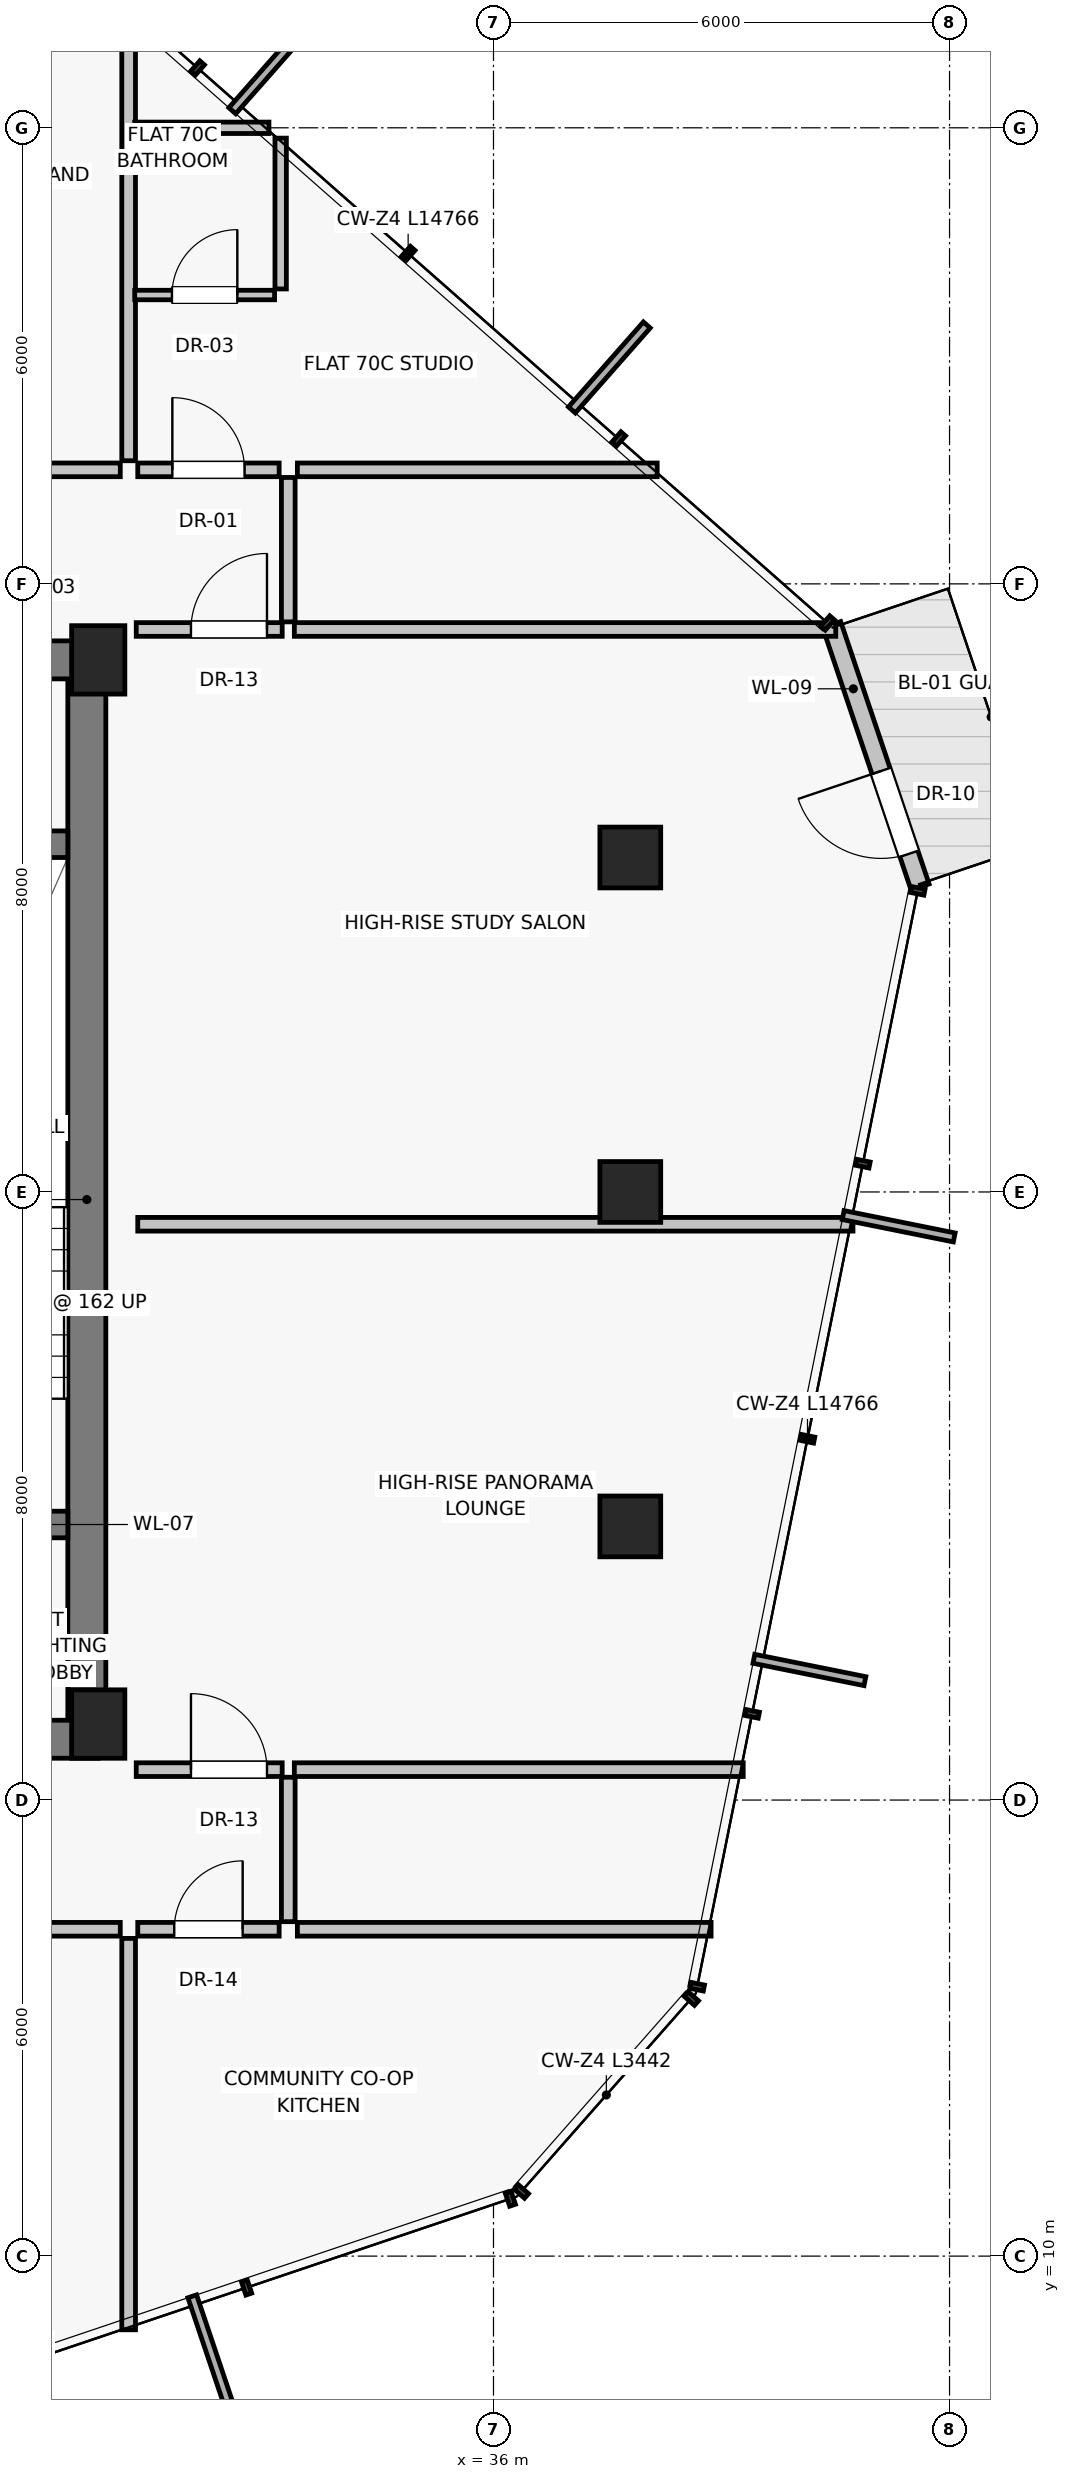
"""IFC4 building model, lengths in metres.
Left out: names, types, materials, properties, quantities, classifications, styles, units other than length and angle.
Written with IfcOpenShell. Run it as: python <this file> out.ifc"""

import sys

from ifc_helpers import new_model, si_unit, direction, frame, frame_2d, origin, origin_2d, place, context, subcontext, project, spatial, rectangle, extrude, source, transform, mapped, element, fill, save


model = new_model("IFC4")
c1 = context("Model", 3, precision=1e-05, world=origin(), true_north=direction((0.0, 1.0)))
c2 = subcontext(c1, "Body", "Model", "MODEL_VIEW")
j1 = project(units=[si_unit("LENGTHUNIT", "METRE"), si_unit("PLANEANGLEUNIT", "RADIAN")], contexts=[c1])
p1 = place(None, origin())
s1 = spatial("IfcSite", under=j1, at=p1, CompositionType="ELEMENT")
p2 = place(p1, origin())
s2 = spatial("IfcBuilding", under=s1, at=p2, CompositionType="ELEMENT")
p3 = place(p2, frame((0.0, 0.0, 248.0)))
s3 = spatial("IfcBuildingStorey", under=s2, at=p3, CompositionType="ELEMENT", Elevation=248.0)
for number, where, z_axis, x_axis in (
    (1, (30.8, 17.0, 0.0), (0.0, 0.0, 1.0), (1.0, 0.0, 0.0)),
    (2, (30.8, 31.0, 0.0), (0.0, 0.0, 1.0), (1.0, 0.0, 0.0)),
):
    element("IfcColumn", number, at=place(p3, frame(where, z_axis=z_axis, x_axis=x_axis)), inside=s3, PredefinedType="PILASTER", context=c2, shape_type="SweptSolid", body=[
        extrude(rectangle(XDim=0.7, YDim=0.9, at=origin_2d()), origin(), (0.0, 0.0, 1.0), 3.25),
    ])
for number, where, z_axis, x_axis in (
    (3, (37.8, 19.6, 0.0), (0.0, 0.0, 1.0), (1.0, 0.0, 0.0)),
    (4, (37.8, 24.0, 0.0), (0.0, 0.0, 1.0), (1.0, 0.0, 0.0)),
    (5, (37.8, 28.4, 0.0), (0.0, 0.0, 1.0), (1.0, 0.0, 0.0)),
):
    element("IfcColumn", number, at=place(p3, frame(where, z_axis=z_axis, x_axis=x_axis)), inside=s3, PredefinedType="COLUMN", context=c2, shape_type="SweptSolid", body=[
        extrude(rectangle(XDim=0.8, YDim=0.8, at=origin_2d()), origin(), (0.0, 0.0, 1.0), 3.25),
    ])
p4 = place(p3, frame((41.612, 28.012, 0.0), z_axis=(0.0, 0.0, 1.0), x_axis=(-0.319242313962, 0.947673121375, 0.0)))
e6 = element("IfcWall", 6, at=p4, inside=s3, PredefinedType="SOLIDWALL", context=c2, shape_type="SweptSolid", body=[
    extrude(rectangle(XDim=3.643, YDim=0.25, at=frame_2d((1.821, 0.0))), origin(), (0.0, 0.0, 1.0), 3.015),
])
p5 = place(p4, frame((0.46, 0.0, 0.0)))
e7 = element("IfcOpeningElement", 7, at=p5, cuts=e6, PredefinedType="OPENING", context=c2, shape_type="SweptSolid", body=[
    extrude(rectangle(XDim=1.15, YDim=2.25, at=frame_2d((0.575, 1.125))), frame((0.0, 0.135, 0.0), z_axis=(0.0, -1.0, 0.0), x_axis=(1.0, 0.0, 0.0)), (0.0, 0.0, 1.0), 0.27),
])
p6 = place(p3, frame((30.65, 16.8, 0.0), z_axis=(0.0, 0.0, 1.0), x_axis=(0.0, 1.0, 0.0)))
e8 = element("IfcWall", 8, at=p6, inside=s3, PredefinedType="SHEAR", context=c2, shape_type="SweptSolid", body=[
    extrude(rectangle(XDim=14.2, YDim=0.5, at=frame_2d((7.1, 0.0))), origin(), (0.0, 0.0, 1.0), 3.015),
])
p7 = place(p3, frame((24.95, 16.8, 0.0), z_axis=(0.0, 0.0, 1.0), x_axis=(1.0, 0.0, 0.0)))
e9 = element("IfcWall", 9, at=p7, inside=s3, PredefinedType="SHEAR", context=c2, shape_type="SweptSolid", body=[
    extrude(rectangle(XDim=5.85, YDim=0.5, at=frame_2d((2.925, 0.0))), origin(), (0.0, 0.0, 1.0), 3.015),
])
p8 = place(p7, frame((2.15, 0.0, 0.0)))
e10 = element("IfcOpeningElement", 10, at=p8, cuts=e9, PredefinedType="OPENING", context=c2, shape_type="SweptSolid", body=[
    extrude(rectangle(XDim=1.2, YDim=2.03, at=frame_2d((0.6, 1.015))), frame((0.0, 0.26, 0.0), z_axis=(0.0, -1.0, 0.0), x_axis=(1.0, 0.0, 0.0)), (0.0, 0.0, 1.0), 0.52),
])
p9 = place(p3, frame((27.0, 31.0, 0.0), z_axis=(0.0, 0.0, 1.0), x_axis=(1.0, 0.0, 0.0)))
e11 = element("IfcWall", 11, at=p9, inside=s3, PredefinedType="SHEAR", context=c2, shape_type="SweptSolid", body=[
    extrude(rectangle(XDim=3.8, YDim=0.5, at=frame_2d((1.9, 0.0))), origin(), (0.0, 0.0, 1.0), 3.015),
])
p10 = place(p9, frame((1.15, 0.0, 0.0)))
e12 = element("IfcOpeningElement", 12, at=p10, cuts=e11, PredefinedType="OPENING", context=c2, shape_type="SweptSolid", body=[
    extrude(rectangle(XDim=1.0, YDim=2.01, at=frame_2d((0.5, 1.005))), frame((0.0, 0.26, 0.0), z_axis=(0.0, -1.0, 0.0), x_axis=(1.0, 0.0, 0.0)), (0.0, 0.0, 1.0), 0.52),
])
p11 = place(p3, frame((27.025, 19.625, 0.0), z_axis=(0.0, 0.0, 1.0), x_axis=(1.0, 0.0, 0.0)))
e13 = element("IfcWall", 13, at=p11, inside=s3, PredefinedType="SHEAR", context=c2, shape_type="SweptSolid", body=[
    extrude(rectangle(XDim=3.375, YDim=0.35, at=frame_2d((1.688, 0.0))), origin(), (0.0, 0.0, 1.0), 3.015),
])
p12 = place(p11, frame((1.05, 0.0, 0.0)))
e14 = element("IfcOpeningElement", 14, at=p12, cuts=e13, PredefinedType="OPENING", context=c2, shape_type="SweptSolid", body=[
    extrude(rectangle(XDim=1.1, YDim=2.03, at=frame_2d((0.55, 1.015))), frame((0.0, 0.185, 0.0), z_axis=(0.0, -1.0, 0.0), x_axis=(1.0, 0.0, 0.0)), (0.0, 0.0, 1.0), 0.37),
])
p13 = place(p3, frame((27.025, 28.575, 0.0), z_axis=(0.0, 0.0, 1.0), x_axis=(1.0, 0.0, 0.0)))
e15 = element("IfcWall", 15, at=p13, inside=s3, PredefinedType="SHEAR", context=c2, shape_type="SweptSolid", body=[
    extrude(rectangle(XDim=3.375, YDim=0.35, at=frame_2d((1.688, 0.0))), origin(), (0.0, 0.0, 1.0), 3.015),
])
p14 = place(p3, frame((31.2, 14.18, 0.0), z_axis=(0.0, 0.0, 1.0), x_axis=(0.0, -1.0, 0.0)))
e16 = element("IfcWall", 16, at=p14, inside=s3, PredefinedType="PARTITIONING", context=c2, shape_type="SweptSolid", body=[
    extrude(rectangle(XDim=5.149, YDim=0.18, at=frame_2d((2.574, 0.0))), origin(), (0.0, 0.0, 1.0), 3.015),
])
p15 = place(p3, frame((23.58, 14.3, 0.0), z_axis=(0.0, 0.0, 1.0), x_axis=(1.0, 0.0, 0.0)))
e17 = element("IfcWall", 17, at=p15, inside=s3, PredefinedType="PARTITIONING", context=c2, shape_type="SweptSolid", body=[
    extrude(rectangle(XDim=7.51, YDim=0.18, at=frame_2d((3.755, 0.0))), origin(), (0.0, 0.0, 1.0), 3.015),
])
p16 = place(p15, frame((3.255, 0.0, 0.0)))
e18 = element("IfcOpeningElement", 18, at=p16, cuts=e17, PredefinedType="OPENING", context=c2, shape_type="SweptSolid", body=[
    extrude(rectangle(XDim=1.0, YDim=2.01, at=frame_2d((0.5, 1.005))), frame((0.0, 0.1, 0.0), z_axis=(0.0, -1.0, 0.0), x_axis=(1.0, 0.0, 0.0)), (0.0, 0.0, 1.0), 0.2),
])
p17 = place(p3, frame((31.2, 33.62, 0.0), z_axis=(0.0, 0.0, 1.0), x_axis=(0.0, 1.0, 0.0)))
e19 = element("IfcWall", 19, at=p17, inside=s3, PredefinedType="PARTITIONING", context=c2, shape_type="SweptSolid", body=[
    extrude(rectangle(XDim=6.006, YDim=0.18, at=frame_2d((3.003, 0.0))), origin(), (0.0, 0.0, 1.0), 3.015),
])
p18 = place(p3, frame((27.33, 33.5, 0.0), z_axis=(0.0, 0.0, 1.0), x_axis=(1.0, 0.0, 0.0)))
e20 = element("IfcWall", 20, at=p18, inside=s3, PredefinedType="PARTITIONING", context=c2, shape_type="SweptSolid", body=[
    extrude(rectangle(XDim=3.76, YDim=0.18, at=frame_2d((1.88, 0.0))), origin(), (0.0, 0.0, 1.0), 3.015),
])
p19 = place(p18, frame((1.38, 0.0, 0.0)))
e21 = element("IfcOpeningElement", 21, at=p19, cuts=e20, PredefinedType="OPENING", context=c2, shape_type="SweptSolid", body=[
    extrude(rectangle(XDim=1.0, YDim=2.01, at=frame_2d((0.5, 1.005))), frame((0.0, 0.1, 0.0), z_axis=(0.0, -1.0, 0.0), x_axis=(1.0, 0.0, 0.0)), (0.0, 0.0, 1.0), 0.2),
])
p20 = place(p3, frame((31.32, 23.575, 0.0), z_axis=(0.0, 0.0, 1.0), x_axis=(1.0, 0.0, 0.0)))
e22 = element("IfcWall", 22, at=p20, inside=s3, PredefinedType="PARTITIONING", context=c2, shape_type="SweptSolid", body=[
    extrude(rectangle(XDim=9.409, YDim=0.18, at=frame_2d((4.705, 0.0))), origin(), (0.0, 0.0, 1.0), 3.015),
])
p21 = place(p3, frame((33.3, 14.4, 0.0), z_axis=(0.0, 0.0, 1.0), x_axis=(0.0, 1.0, 0.0)))
e23 = element("IfcWall", 23, at=p21, inside=s3, PredefinedType="PARTITIONING", context=c2, shape_type="SweptSolid", body=[
    extrude(rectangle(XDim=1.9, YDim=0.18, at=frame_2d((0.95, 0.0))), origin(), (0.0, 0.0, 1.0), 3.015),
])
p22 = place(p3, frame((33.3, 31.5, 0.0), z_axis=(0.0, 0.0, 1.0), x_axis=(0.0, 1.0, 0.0)))
e24 = element("IfcWall", 24, at=p22, inside=s3, PredefinedType="PARTITIONING", context=c2, shape_type="SweptSolid", body=[
    extrude(rectangle(XDim=1.9, YDim=0.18, at=frame_2d((0.95, 0.0))), origin(), (0.0, 0.0, 1.0), 3.015),
])
p23 = place(p3, frame((31.3, 16.4, 0.0), z_axis=(0.0, 0.0, 1.0), x_axis=(1.0, 0.0, 0.0)))
e25 = element("IfcWall", 25, at=p23, inside=s3, PredefinedType="PARTITIONING", context=c2, shape_type="SweptSolid", body=[
    extrude(rectangle(XDim=1.92, YDim=0.18, at=frame_2d((0.96, 0.0))), origin(), (0.0, 0.0, 1.0), 3.015),
])
p24 = place(p23, frame((0.72, 0.0, 0.0)))
e26 = element("IfcOpeningElement", 26, at=p24, cuts=e25, PredefinedType="OPENING", context=c2, shape_type="SweptSolid", body=[
    extrude(rectangle(XDim=1.0, YDim=2.01, at=frame_2d((0.5, 1.005))), frame((0.0, 0.1, 0.0), z_axis=(0.0, -1.0, 0.0), x_axis=(1.0, 0.0, 0.0)), (0.0, 0.0, 1.0), 0.2),
])
p25 = place(p3, frame((33.38, 16.4, 0.0), z_axis=(0.0, 0.0, 1.0), x_axis=(1.0, 0.0, 0.0)))
e27 = element("IfcWall", 27, at=p25, inside=s3, PredefinedType="PARTITIONING", context=c2, shape_type="SweptSolid", body=[
    extrude(rectangle(XDim=5.906, YDim=0.18, at=frame_2d((2.953, 0.0))), origin(), (0.0, 0.0, 1.0), 3.015),
])
p26 = place(p3, frame((31.3, 31.4, 0.0), z_axis=(0.0, 0.0, 1.0), x_axis=(1.0, 0.0, 0.0)))
e28 = element("IfcWall", 28, at=p26, inside=s3, PredefinedType="PARTITIONING", context=c2, shape_type="SweptSolid", body=[
    extrude(rectangle(XDim=1.92, YDim=0.18, at=frame_2d((0.96, 0.0))), origin(), (0.0, 0.0, 1.0), 3.015),
])
p27 = place(p26, frame((0.72, 0.0, 0.0)))
e29 = element("IfcOpeningElement", 29, at=p27, cuts=e28, PredefinedType="OPENING", context=c2, shape_type="SweptSolid", body=[
    extrude(rectangle(XDim=1.0, YDim=2.01, at=frame_2d((0.5, 1.005))), frame((0.0, 0.1, 0.0), z_axis=(0.0, -1.0, 0.0), x_axis=(1.0, 0.0, 0.0)), (0.0, 0.0, 1.0), 0.2),
])
p28 = place(p3, frame((33.38, 31.4, 0.0), z_axis=(0.0, 0.0, 1.0), x_axis=(1.0, 0.0, 0.0)))
e30 = element("IfcWall", 30, at=p28, inside=s3, PredefinedType="PARTITIONING", context=c2, shape_type="SweptSolid", body=[
    extrude(rectangle(XDim=7.123, YDim=0.18, at=frame_2d((3.562, 0.0))), origin(), (0.0, 0.0, 1.0), 3.015),
])
p29 = place(p3, frame((33.42, 14.3, 0.0), z_axis=(0.0, 0.0, 1.0), x_axis=(1.0, 0.0, 0.0)))
e31 = element("IfcWall", 31, at=p29, inside=s3, PredefinedType="PARTITIONING", context=c2, shape_type="SweptSolid", body=[
    extrude(rectangle(XDim=5.443, YDim=0.18, at=frame_2d((2.721, 0.0))), origin(), (0.0, 0.0, 1.0), 3.015),
])
p30 = place(p3, frame((31.32, 14.3, 0.0), z_axis=(0.0, 0.0, 1.0), x_axis=(1.0, 0.0, 0.0)))
e32 = element("IfcWall", 32, at=p30, inside=s3, PredefinedType="PARTITIONING", context=c2, shape_type="SweptSolid", body=[
    extrude(rectangle(XDim=1.86, YDim=0.18, at=frame_2d((0.93, 0.0))), origin(), (0.0, 0.0, 1.0), 3.015),
])
p31 = place(p30, frame((0.48, 0.0, 0.0)))
e33 = element("IfcOpeningElement", 33, at=p31, cuts=e32, PredefinedType="OPENING", context=c2, shape_type="SweptSolid", body=[
    extrude(rectangle(XDim=0.9, YDim=2.01, at=frame_2d((0.45, 1.005))), frame((0.0, 0.1, 0.0), z_axis=(0.0, -1.0, 0.0), x_axis=(1.0, 0.0, 0.0)), (0.0, 0.0, 1.0), 0.2),
])
p32 = place(p3, frame((33.42, 33.5, 0.0), z_axis=(0.0, 0.0, 1.0), x_axis=(1.0, 0.0, 0.0)))
e34 = element("IfcWall", 34, at=p32, inside=s3, PredefinedType="PARTITIONING", context=c2, shape_type="SweptSolid", body=[
    extrude(rectangle(XDim=4.734, YDim=0.18, at=frame_2d((2.367, 0.0))), origin(), (0.0, 0.0, 1.0), 3.015),
])
p33 = place(p3, frame((31.32, 33.5, 0.0), z_axis=(0.0, 0.0, 1.0), x_axis=(1.0, 0.0, 0.0)))
e35 = element("IfcWall", 35, at=p33, inside=s3, PredefinedType="PARTITIONING", context=c2, shape_type="SweptSolid", body=[
    extrude(rectangle(XDim=1.86, YDim=0.18, at=frame_2d((0.93, 0.0))), origin(), (0.0, 0.0, 1.0), 3.015),
])
p34 = place(p33, frame((0.455, 0.0, 0.0)))
e36 = element("IfcOpeningElement", 36, at=p34, cuts=e35, PredefinedType="OPENING", context=c2, shape_type="SweptSolid", body=[
    extrude(rectangle(XDim=0.95, YDim=2.02, at=frame_2d((0.475, 1.01))), frame((0.0, 0.1, 0.0), z_axis=(0.0, -1.0, 0.0), x_axis=(1.0, 0.0, 0.0)), (0.0, 0.0, 1.0), 0.2),
])
p35 = place(p3, frame((31.28, 35.8, 0.0), z_axis=(0.0, 0.0, 1.0), x_axis=(1.0, 0.0, 0.0)))
e37 = element("IfcWall", 37, at=p35, inside=s3, PredefinedType="PARTITIONING", context=c2, shape_type="SweptSolid", body=[
    extrude(rectangle(XDim=1.84, YDim=0.125, at=frame_2d((0.92, 0.0))), origin(), (0.0, 0.0, 1.0), 3.015),
])
p36 = place(p35, frame((0.49, 0.0, 0.0)))
e38 = element("IfcOpeningElement", 38, at=p36, cuts=e37, PredefinedType="OPENING", context=c2, shape_type="SweptSolid", body=[
    extrude(rectangle(XDim=0.86, YDim=2.01, at=frame_2d((0.43, 1.005))), frame((0.0, 0.073, 0.0), z_axis=(0.0, -1.0, 0.0), x_axis=(1.0, 0.0, 0.0)), (0.0, 0.0, 1.0), 0.145),
])
p37 = place(p3, frame((31.28, 38.0, 0.0), z_axis=(0.0, 0.0, 1.0), x_axis=(1.0, 0.0, 0.0)))
e39 = element("IfcWall", 39, at=p37, inside=s3, PredefinedType="PARTITIONING", context=c2, shape_type="SweptSolid", body=[
    extrude(rectangle(XDim=1.766, YDim=0.15, at=frame_2d((0.883, 0.0))), origin(), (0.0, 0.0, 1.0), 3.015),
])
p38 = place(p3, frame((33.2, 35.88, 0.0), z_axis=(0.0, 0.0, 1.0), x_axis=(0.0, 1.0, 0.0)))
e40 = element("IfcWall", 40, at=p38, inside=s3, PredefinedType="PARTITIONING", context=c2, shape_type="SweptSolid", body=[
    extrude(rectangle(XDim=1.984, YDim=0.15, at=frame_2d((0.992, 0.0))), origin(), (0.0, 0.0, 1.0), 3.015),
])
m1 = source(origin(), c2, "Body", "SweptSolid", [
    extrude(rectangle(XDim=1.15, YDim=2.25, at=frame_2d((0.575, 1.125))), frame((0.0, 0.025, 0.0), z_axis=(0.0, -1.0, 0.0), x_axis=(1.0, 0.0, 0.0)), (0.0, 0.0, 1.0), 0.05),
])
p39 = place(p5, frame((1.15, 0.0, 0.0), z_axis=(0.0, 0.0, 1.0), x_axis=(-1.0, 0.0, 0.0)))
e41 = element("IfcDoor", 41, at=p39, inside=s3, OperationType="SINGLE_SWING_RIGHT", PredefinedType="DOOR", context=c2, shape_type="MappedRepresentation", body=[
    mapped(m1, transform((0.0, 0.0, 0.0), scale=1.0)),
])
fill(e7, e41)
m2 = source(origin(), c2, "Body", "SweptSolid", [
    extrude(rectangle(XDim=1.0, YDim=2.01, at=frame_2d((0.5, 1.005))), frame((0.0, 0.025, 0.0), z_axis=(0.0, -1.0, 0.0), x_axis=(1.0, 0.0, 0.0)), (0.0, 0.0, 1.0), 0.05),
])
p40 = place(p24, origin())
e42 = element("IfcDoor", 42, at=p40, inside=s3, OperationType="SINGLE_SWING_LEFT", PredefinedType="DOOR", context=c2, shape_type="MappedRepresentation", body=[
    mapped(m2, transform((0.0, 0.0, 0.0), scale=1.0)),
])
fill(e26, e42)
p41 = place(p27, origin())
e43 = element("IfcDoor", 43, at=p41, inside=s3, OperationType="SINGLE_SWING_RIGHT", PredefinedType="DOOR", context=c2, shape_type="MappedRepresentation", body=[
    mapped(m2, transform((0.0, 0.0, 0.0), scale=1.0)),
])
fill(e29, e43)
m3 = source(origin(), c2, "Body", "SweptSolid", [
    extrude(rectangle(XDim=0.9, YDim=2.01, at=frame_2d((0.45, 1.005))), frame((0.0, 0.025, 0.0), z_axis=(0.0, -1.0, 0.0), x_axis=(1.0, 0.0, 0.0)), (0.0, 0.0, 1.0), 0.05),
])
p42 = place(p31, origin())
e44 = element("IfcDoor", 44, at=p42, inside=s3, OperationType="SINGLE_SWING_RIGHT", PredefinedType="DOOR", context=c2, shape_type="MappedRepresentation", body=[
    mapped(m3, transform((0.0, 0.0, 0.0), scale=1.0)),
])
fill(e33, e44)
m4 = source(origin(), c2, "Body", "SweptSolid", [
    extrude(rectangle(XDim=0.95, YDim=2.02, at=frame_2d((0.475, 1.01))), frame((0.0, 0.025, 0.0), z_axis=(0.0, -1.0, 0.0), x_axis=(1.0, 0.0, 0.0)), (0.0, 0.0, 1.0), 0.05),
])
p43 = place(p34, origin())
e45 = element("IfcDoor", 45, at=p43, inside=s3, OperationType="SINGLE_SWING_LEFT", PredefinedType="DOOR", context=c2, shape_type="MappedRepresentation", body=[
    mapped(m4, transform((0.0, 0.0, 0.0), scale=1.0)),
])
fill(e36, e45)
m5 = source(origin(), c2, "Body", "SweptSolid", [
    extrude(rectangle(XDim=0.86, YDim=2.01, at=frame_2d((0.43, 1.005))), frame((0.0, 0.025, 0.0), z_axis=(0.0, -1.0, 0.0), x_axis=(1.0, 0.0, 0.0)), (0.0, 0.0, 1.0), 0.05),
])
p44 = place(p36, origin())
e46 = element("IfcDoor", 46, at=p44, inside=s3, OperationType="SINGLE_SWING_RIGHT", PredefinedType="DOOR", context=c2, shape_type="MappedRepresentation", body=[
    mapped(m5, transform((0.0, 0.0, 0.0), scale=1.0)),
])
fill(e38, e46)
save(model, sys.argv[1])
